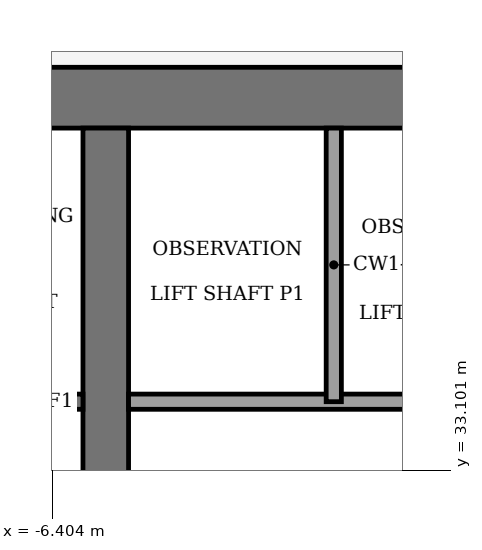
"""IFC4 building model, lengths in metres.
Left out: names, types, materials, properties, quantities, classifications, styles, units other than length and angle.
Written with IfcOpenShell. Run it as: python <this file> out.ifc"""

import sys

from ifc_helpers import new_model, si_unit, direction, frame, frame_2d, origin, place, context, subcontext, project, spatial, rectangle, extrude, element, save


model = new_model("IFC4")
c1 = context("Model", 3, precision=1e-05, world=origin(), true_north=direction((0.0, 1.0)))
c2 = subcontext(c1, "Body", "Model", "MODEL_VIEW")
j1 = project(units=[si_unit("LENGTHUNIT", "METRE"), si_unit("PLANEANGLEUNIT", "RADIAN")], contexts=[c1])
p1 = place(None, origin())
s1 = spatial("IfcSite", under=j1, at=p1, CompositionType="ELEMENT")
p2 = place(p1, origin())
s2 = spatial("IfcBuilding", under=s1, at=p2, CompositionType="ELEMENT")
p3 = place(p2, frame((0.0, 0.0, 233.0)))
s3 = spatial("IfcBuildingStorey", under=s2, at=p3, CompositionType="ELEMENT", Elevation=233.0)
p4 = place(p3, frame((-13.4, 38.0, -0.13), z_axis=(0.0, 0.0, 1.0), x_axis=(1.0, 0.0, 0.0)))
e1 = element("IfcWall", 1, at=p4, inside=s3, PredefinedType="SHEAR", context=c2, shape_type="SweptSolid", body=[
    extrude(rectangle(XDim=26.8, YDim=0.8, at=frame_2d((13.4, 0.0))), origin(), (0.0, 0.0, 1.0), 5.0),
])
p5 = place(p3, frame((-5.7, 18.4, -0.13), z_axis=(0.0, 0.0, 1.0), x_axis=(0.0, 1.0, 0.0)))
e2 = element("IfcWall", 2, at=p5, inside=s3, PredefinedType="SHEAR", context=c2, shape_type="SweptSolid", body=[
    extrude(rectangle(XDim=19.2, YDim=0.6, at=frame_2d((9.6, 0.0))), origin(), (0.0, 0.0, 1.0), 5.0),
])
p6 = place(p5, frame((8.35, 0.0, 0.13)))
e3 = element("IfcOpeningElement", 3, at=p6, cuts=e2, PredefinedType="OPENING", context=c2, shape_type="SweptSolid", body=[
    extrude(rectangle(XDim=0.9, YDim=2.1, at=frame_2d((0.45, 1.05))), frame((0.0, 0.31, 0.0), z_axis=(0.0, -1.0, 0.0), x_axis=(1.0, 0.0, 0.0)), (0.0, 0.0, 1.0), 0.62),
])
p7 = place(p3, frame((-12.6, 34.0, 0.0), z_axis=(0.0, 0.0, 1.0), x_axis=(1.0, 0.0, 0.0)))
e4 = element("IfcWall", 4, at=p7, inside=s3, PredefinedType="PARTITIONING", context=c2, shape_type="SweptSolid", body=[
    extrude(rectangle(XDim=6.6, YDim=0.2, at=frame_2d((3.3, 0.0))), origin(), (0.0, 0.0, 1.0), 4.87),
])
p8 = place(p7, frame((4.7, 0.0, 0.0)))
e5 = element("IfcOpeningElement", 5, at=p8, cuts=e4, PredefinedType="OPENING", context=c2, shape_type="SweptSolid", body=[
    extrude(rectangle(XDim=1.4, YDim=2.2, at=frame_2d((0.7, 1.1))), frame((0.0, 0.11, 0.0), z_axis=(0.0, -1.0, 0.0), x_axis=(1.0, 0.0, 0.0)), (0.0, 0.0, 1.0), 0.22),
])
p9 = place(p7, frame((2.3, 0.0, 0.0)))
e6 = element("IfcOpeningElement", 6, at=p9, cuts=e4, PredefinedType="OPENING", context=c2, shape_type="SweptSolid", body=[
    extrude(rectangle(XDim=1.4, YDim=2.2, at=frame_2d((0.7, 1.1))), frame((0.0, 0.11, 0.0), z_axis=(0.0, -1.0, 0.0), x_axis=(1.0, 0.0, 0.0)), (0.0, 0.0, 1.0), 0.22),
])
p10 = place(p7, frame((0.45, 0.0, 0.0)))
e7 = element("IfcOpeningElement", 7, at=p10, cuts=e4, PredefinedType="OPENING", context=c2, shape_type="SweptSolid", body=[
    extrude(rectangle(XDim=0.9, YDim=2.1, at=frame_2d((0.45, 1.05))), frame((0.0, 0.11, 0.0), z_axis=(0.0, -1.0, 0.0), x_axis=(1.0, 0.0, 0.0)), (0.0, 0.0, 1.0), 0.22),
])
p11 = place(p3, frame((-5.4, 34.0, 0.0), z_axis=(0.0, 0.0, 1.0), x_axis=(1.0, 0.0, 0.0)))
e8 = element("IfcWall", 8, at=p11, inside=s3, PredefinedType="PARTITIONING", context=c2, shape_type="SweptSolid", body=[
    extrude(rectangle(XDim=10.8, YDim=0.2, at=frame_2d((5.4, 0.0))), origin(), (0.0, 0.0, 1.0), 4.87),
])
p12 = place(p11, frame((6.15, 0.0, 0.0)))
e9 = element("IfcOpeningElement", 9, at=p12, cuts=e8, PredefinedType="OPENING", context=c2, shape_type="SweptSolid", body=[
    extrude(rectangle(XDim=1.2, YDim=2.2, at=frame_2d((0.6, 1.1))), frame((0.0, 0.11, 0.0), z_axis=(0.0, -1.0, 0.0), x_axis=(1.0, 0.0, 0.0)), (0.0, 0.0, 1.0), 0.22),
])
p13 = place(p11, frame((8.95, 0.0, 0.0)))
e10 = element("IfcOpeningElement", 10, at=p13, cuts=e8, PredefinedType="OPENING", context=c2, shape_type="SweptSolid", body=[
    extrude(rectangle(XDim=1.0, YDim=2.1, at=frame_2d((0.5, 1.05))), frame((0.0, 0.11, 0.0), z_axis=(0.0, -1.0, 0.0), x_axis=(1.0, 0.0, 0.0)), (0.0, 0.0, 1.0), 0.22),
])
p14 = place(p3, frame((-2.7, 34.0, 0.0), z_axis=(0.0, 0.0, 1.0), x_axis=(0.0, 1.0, 0.0)))
e11 = element("IfcWall", 11, at=p14, inside=s3, PredefinedType="PARTITIONING", context=c2, shape_type="SweptSolid", body=[
    extrude(rectangle(XDim=3.6, YDim=0.2, at=frame_2d((1.8, 0.0))), origin(), (0.0, 0.0, 1.0), 4.87),
])
save(model, sys.argv[1])
